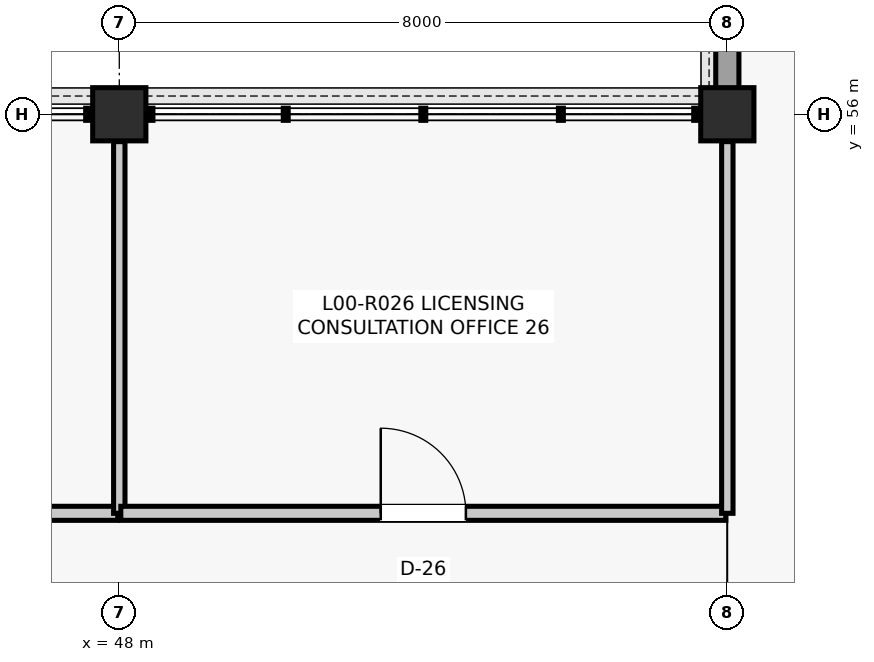
"""IFC4 building model, lengths in metres.
Left out: names, types, materials, properties, quantities, classifications, styles, units other than length and angle.
Written with IfcOpenShell. Run it as: python <this file> out.ifc"""

import sys

from ifc_helpers import new_model, si_unit, direction, frame, frame_2d, origin, origin_2d, place, context, subcontext, project, spatial, rectangle, extrude, element, fill, save


model = new_model("IFC4")
c1 = context("Model", 3, precision=1e-05, world=origin(), true_north=direction((0.0, 1.0)))
c2 = subcontext(c1, "Body", "Model", "MODEL_VIEW")
j1 = project(units=[si_unit("LENGTHUNIT", "METRE"), si_unit("PLANEANGLEUNIT", "RADIAN")], contexts=[c1])
p1 = place(None, origin())
s1 = spatial("IfcSite", under=j1, at=p1, CompositionType="ELEMENT")
p2 = place(p1, origin())
s2 = spatial("IfcBuilding", under=s1, at=p2, CompositionType="ELEMENT")
p3 = place(p2, origin())
s3 = spatial("IfcBuildingStorey", under=s2, at=p3, CompositionType="ELEMENT", Elevation=0.0)
for number, where, z_axis, x_axis in (
    (1, (48.0, 56.0, 0.0), (0.0, 0.0, 1.0), (1.0, 0.0, 0.0)),
    (2, (56.0, 56.0, 0.0), (0.0, 0.0, 1.0), (1.0, 0.0, 0.0)),
):
    element("IfcColumn", number, at=place(p3, frame(where, z_axis=z_axis, x_axis=x_axis)), inside=s3, PredefinedType="COLUMN", context=c2, shape_type="SweptSolid", body=[
        extrude(rectangle(XDim=0.7, YDim=0.7, at=origin_2d()), origin(), (0.0, 0.0, 1.0), 5.28),
    ])
p4 = place(p3, frame((56.0, 56.335, 0.0), z_axis=(0.0, 0.0, 1.0), x_axis=(0.0, 1.0, 0.0)))
e3 = element("IfcWall", 3, at=p4, inside=s3, PredefinedType="SOLIDWALL", context=c2, shape_type="SweptSolid", body=[
    extrude(rectangle(XDim=7.33, YDim=0.305, at=frame_2d((3.665, 0.0))), origin(), (0.0, 0.0, 1.0), 4.614),
])
p5 = place(p4, frame((0.744, 0.0, 0.95)))
e4 = element("IfcOpeningElement", 4, at=p5, cuts=e3, PredefinedType="OPENING", context=c2, shape_type="SweptSolid", body=[
    extrude(rectangle(XDim=1.15, YDim=1.65, at=frame_2d((0.575, 0.825))), frame((0.0, 0.162, 0.0), z_axis=(0.0, -1.0, 0.0), x_axis=(1.0, 0.0, 0.0)), (0.0, 0.0, 1.0), 0.325),
])
p6 = place(p4, frame((5.436, 0.0, 0.95)))
e5 = element("IfcOpeningElement", 5, at=p6, cuts=e3, PredefinedType="OPENING", context=c2, shape_type="SweptSolid", body=[
    extrude(rectangle(XDim=1.15, YDim=1.65, at=frame_2d((0.575, 0.825))), frame((0.0, 0.162, 0.0), z_axis=(0.0, -1.0, 0.0), x_axis=(1.0, 0.0, 0.0)), (0.0, 0.0, 1.0), 0.325),
])
p7 = place(p3, frame((40.02, 50.75, 0.0), z_axis=(0.0, 0.0, 1.0), x_axis=(1.0, 0.0, 0.0)))
e6 = element("IfcWall", 6, at=p7, inside=s3, PredefinedType="PARTITIONING", context=c2, shape_type="SweptSolid", body=[
    extrude(rectangle(XDim=7.96, YDim=0.185, at=frame_2d((3.98, 0.0))), origin(), (0.0, 0.0, 1.0), 4.403),
])
p8 = place(p7, frame((3.46, 0.0, 0.0)))
e7 = element("IfcOpeningElement", 7, at=p8, cuts=e6, PredefinedType="OPENING", context=c2, shape_type="SweptSolid", body=[
    extrude(rectangle(XDim=1.04, YDim=2.18, at=frame_2d((0.52, 1.09))), frame((0.0, 0.103, 0.0), z_axis=(0.0, -1.0, 0.0), x_axis=(1.0, 0.0, 0.0)), (0.0, 0.0, 1.0), 0.205),
])
p9 = place(p3, frame((48.0, 50.75, 0.0), z_axis=(0.0, 0.0, 1.0), x_axis=(0.0, 1.0, 0.0)))
e8 = element("IfcWall", 8, at=p9, inside=s3, PredefinedType="PARTITIONING", context=c2, shape_type="SweptSolid", body=[
    extrude(rectangle(XDim=4.89, YDim=0.15, at=frame_2d((2.445, 0.0))), origin(), (0.0, 0.0, 1.0), 4.403),
])
p10 = place(p3, frame((48.02, 50.75, 0.0), z_axis=(0.0, 0.0, 1.0), x_axis=(1.0, 0.0, 0.0)))
e9 = element("IfcWall", 9, at=p10, inside=s3, PredefinedType="PARTITIONING", context=c2, shape_type="SweptSolid", body=[
    extrude(rectangle(XDim=7.96, YDim=0.185, at=frame_2d((3.98, 0.0))), origin(), (0.0, 0.0, 1.0), 4.403),
])
p11 = place(p10, frame((3.42, 0.0, 0.0)))
e10 = element("IfcOpeningElement", 10, at=p11, cuts=e9, PredefinedType="OPENING", context=c2, shape_type="SweptSolid", body=[
    extrude(rectangle(XDim=1.12, YDim=2.22, at=frame_2d((0.56, 1.11))), frame((0.0, 0.103, 0.0), z_axis=(0.0, -1.0, 0.0), x_axis=(1.0, 0.0, 0.0)), (0.0, 0.0, 1.0), 0.205),
])
p12 = place(p3, frame((56.0, 50.75, 0.0), z_axis=(0.0, 0.0, 1.0), x_axis=(0.0, 1.0, 0.0)))
e11 = element("IfcWall", 11, at=p12, inside=s3, PredefinedType="PARTITIONING", context=c2, shape_type="SweptSolid", body=[
    extrude(rectangle(XDim=4.89, YDim=0.15, at=frame_2d((2.445, 0.0))), origin(), (0.0, 0.0, 1.0), 4.412),
])
p13 = place(p11, origin())
e12 = element("IfcDoor", 12, at=p13, inside=s3, OperationType="SINGLE_SWING_LEFT", PredefinedType="DOOR", context=c2, shape_type="SweptSolid", body=[
    extrude(rectangle(XDim=1.12, YDim=2.22, at=frame_2d((0.56, 1.11))), frame((0.0, 0.025, 0.0), z_axis=(0.0, -1.0, 0.0), x_axis=(1.0, 0.0, 0.0)), (0.0, 0.0, 1.0), 0.05),
])
fill(e10, e12)
save(model, sys.argv[1])
